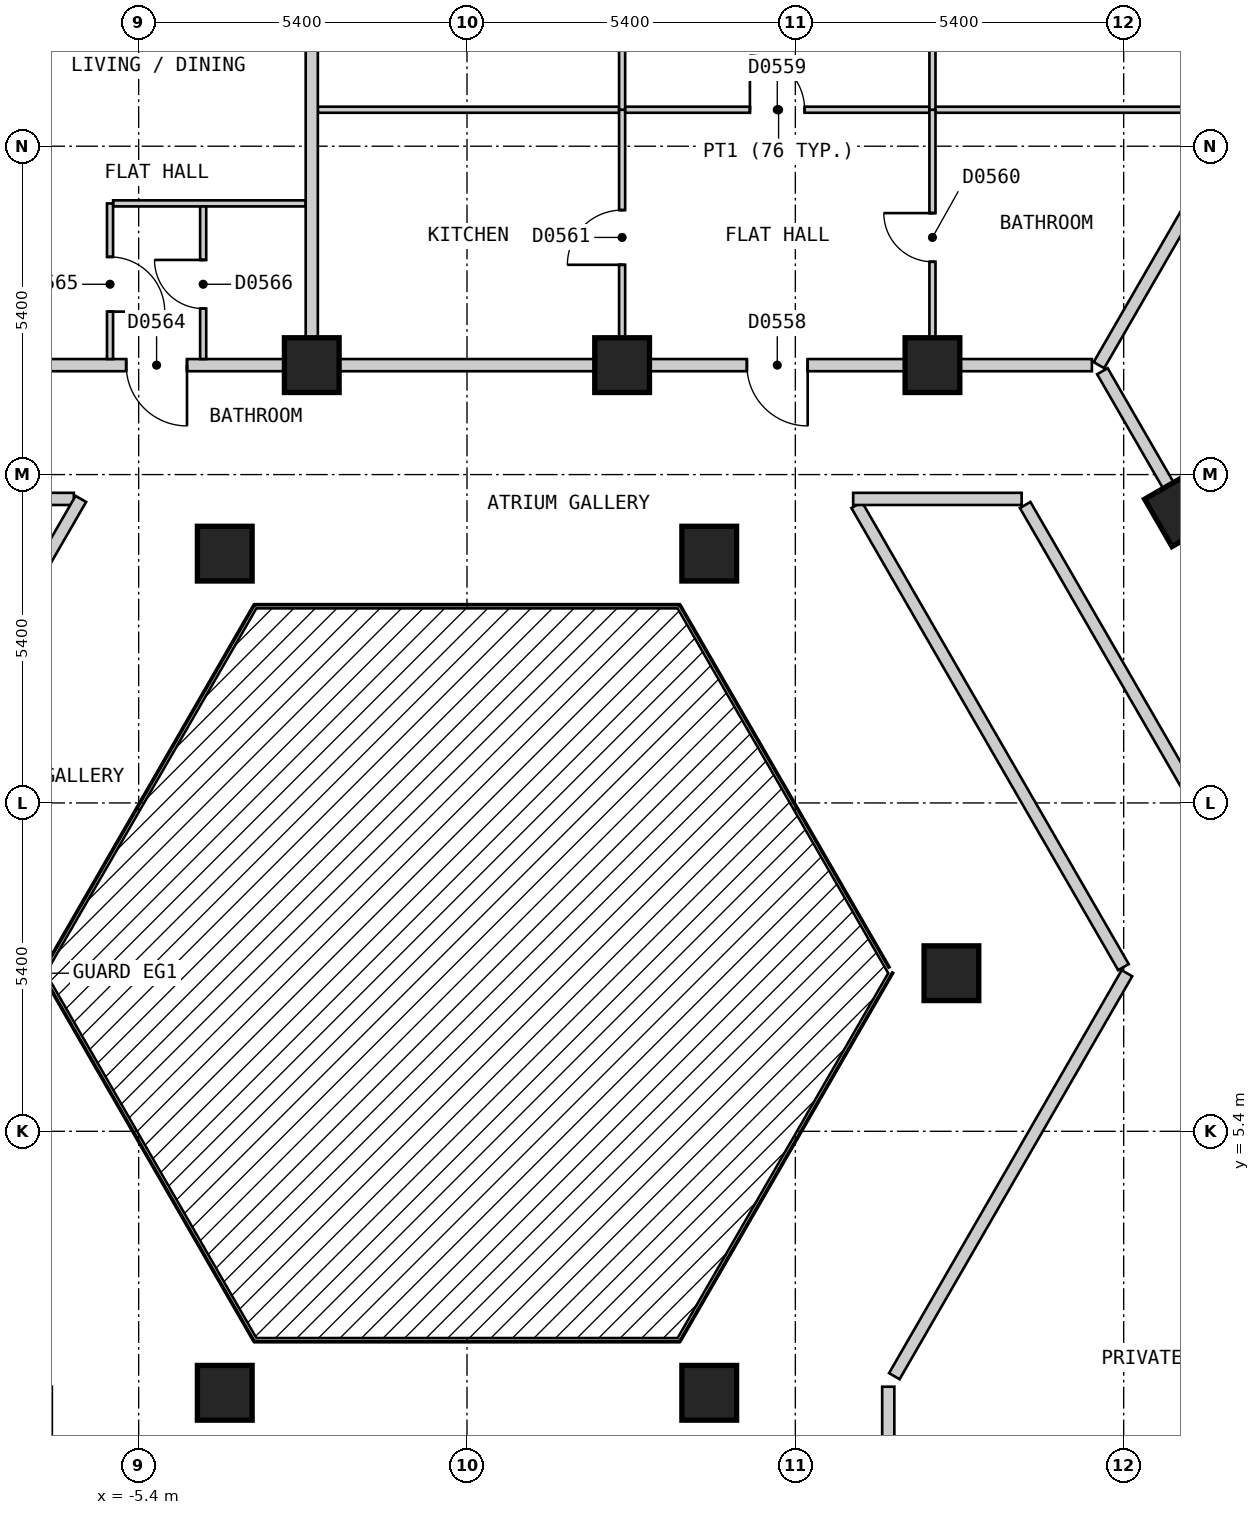
"""IFC4 building model, lengths in metres.
Left out: names, types, materials, properties, quantities, classifications, styles, units other than length and angle.
Written with IfcOpenShell. Run it as: python <this file> out.ifc"""

import sys

from ifc_helpers import new_model, si_unit, direction, frame, frame_2d, origin, origin_2d, place, context, subcontext, project, spatial, rectangle, extrude, element, fill, save


model = new_model("IFC4")
c1 = context("Model", 3, precision=1e-05, world=origin(), true_north=direction((0.0, 1.0)))
c2 = subcontext(c1, "Body", "Model", "MODEL_VIEW")
j1 = project(units=[si_unit("LENGTHUNIT", "METRE"), si_unit("PLANEANGLEUNIT", "RADIAN")], contexts=[c1])
p1 = place(None, origin())
s1 = spatial("IfcSite", under=j1, at=p1, CompositionType="ELEMENT")
p2 = place(p1, origin())
s2 = spatial("IfcBuilding", under=s1, at=p2, CompositionType="ELEMENT")
p3 = place(p2, frame((0.0, 0.0, 56.4)))
s3 = spatial("IfcBuildingStorey", under=s2, at=p3, CompositionType="ELEMENT", Elevation=56.4)
for number, where, z_axis, x_axis in (
    (1, (3.984, 1.1, 0.0), (0.0, 0.0, 1.0), (1.0, 0.0, 0.0)),
    (2, (7.967, 8.0, 0.0), (0.0, 0.0, 1.0), (1.0, 0.0, 0.0)),
    (3, (11.76, 15.631, 0.0), (0.0, 0.0, 1.0), (-0.5, 0.866, 0.0)),
    (4, (7.655, 18.0, 0.0), (0.0, 0.0, 1.0), (-1.0, 0.0, 0.0)),
    (5, (3.984, 14.9, 0.0), (0.0, 0.0, 1.0), (1.0, 0.0, 0.0)),
    (6, (2.551, 18.0, 0.0), (0.0, 0.0, 1.0), (-1.0, 0.0, 0.0)),
    (7, (-2.553, 18.0, 0.0), (0.0, 0.0, 1.0), (-1.0, 0.0, 0.0)),
    (8, (-3.984, 14.9, 0.0), (0.0, 0.0, 1.0), (1.0, 0.0, 0.0)),
    (9, (-3.984, 1.1, 0.0), (0.0, 0.0, 1.0), (1.0, 0.0, 0.0)),
):
    element("IfcColumn", number, at=place(p3, frame(where, z_axis=z_axis, x_axis=x_axis)), inside=s3, PredefinedType="COLUMN", context=c2, shape_type="SweptSolid", body=[
        extrude(rectangle(XDim=0.9, YDim=0.9, at=origin_2d()), origin(), (0.0, 0.0, 1.0), 3.0),
    ])
p4 = place(p3, frame((6.409, 15.7, 0.0), z_axis=(0.0, 0.0, 1.0), x_axis=(0.499930377127, -0.866065596838, 0.0)))
e10 = element("IfcWall", 10, at=p4, inside=s3, PredefinedType="PARTITIONING", context=c2, shape_type="SweptSolid", body=[
    extrude(rectangle(XDim=8.775, YDim=0.2, at=frame_2d((4.388, 0.0))), origin(), (0.0, 0.0, 1.0), 2.7),
])
p5 = place(p3, frame((9.18, 15.7, 0.0), z_axis=(0.0, 0.0, 1.0), x_axis=(0.500003652032, -0.866023295272, 0.0)))
e11 = element("IfcWall", 11, at=p5, inside=s3, PredefinedType="PARTITIONING", context=c2, shape_type="SweptSolid", body=[
    extrude(rectangle(XDim=18.012, YDim=0.2, at=frame_2d((9.006, 0.0))), origin(), (0.0, 0.0, 1.0), 2.7),
])
p6 = place(p5, frame((8.556, 0.0, 0.0)))
e12 = element("IfcOpeningElement", 12, at=p6, cuts=e11, PredefinedType="OPENING", context=c2, shape_type="SweptSolid", body=[
    extrude(rectangle(XDim=0.9, YDim=2.1, at=frame_2d((0.45, 1.05))), frame((0.0, 0.11, 0.0), z_axis=(0.0, -1.0, 0.0), x_axis=(1.0, 0.0, 0.0)), (0.0, 0.0, 1.0), 0.22),
])
p7 = place(p3, frame((10.45, 17.9, 0.0), z_axis=(0.0, 0.0, 1.0), x_axis=(0.500034352617, -0.866005569383, 0.0)))
e13 = element("IfcWall", 13, at=p7, inside=s3, PredefinedType="PARTITIONING", context=c2, shape_type="SweptSolid", body=[
    extrude(rectangle(XDim=20.553, YDim=0.2, at=frame_2d((10.276, 0.0))), origin(), (0.0, 0.0, 1.0), 2.7),
])
p8 = place(p7, frame((14.902, 0.0, 0.0)))
e14 = element("IfcOpeningElement", 14, at=p8, cuts=e13, PredefinedType="OPENING", context=c2, shape_type="SweptSolid", body=[
    extrude(rectangle(XDim=1.0, YDim=2.1, at=frame_2d((0.5, 1.05))), frame((0.0, 0.11, 0.0), z_axis=(0.0, -1.0, 0.0), x_axis=(1.0, 0.0, 0.0)), (0.0, 0.0, 1.0), 0.22),
])
p9 = place(p7, frame((4.671, 0.0, 0.0)))
e15 = element("IfcOpeningElement", 15, at=p9, cuts=e13, PredefinedType="OPENING", context=c2, shape_type="SweptSolid", body=[
    extrude(rectangle(XDim=1.0, YDim=2.1, at=frame_2d((0.5, 1.05))), frame((0.0, 0.11, 0.0), z_axis=(0.0, -1.0, 0.0), x_axis=(1.0, 0.0, 0.0)), (0.0, 0.0, 1.0), 0.22),
])
p10 = place(p3, frame((-9.006, 15.8, 0.0), z_axis=(0.0, 0.0, 1.0), x_axis=(1.0, 0.0, 0.0)))
e16 = element("IfcWall", 16, at=p10, inside=s3, PredefinedType="PARTITIONING", context=c2, shape_type="SweptSolid", body=[
    extrude(rectangle(XDim=2.54, YDim=0.2, at=frame_2d((1.27, 0.0))), origin(), (0.0, 0.0, 1.0), 2.7),
])
p11 = place(p3, frame((6.351, 15.8, 0.0), z_axis=(0.0, 0.0, 1.0), x_axis=(1.0, 0.0, 0.0)))
e17 = element("IfcWall", 17, at=p11, inside=s3, PredefinedType="PARTITIONING", context=c2, shape_type="SweptSolid", body=[
    extrude(rectangle(XDim=2.771, YDim=0.2, at=frame_2d((1.385, 0.0))), origin(), (0.0, 0.0, 1.0), 2.7),
])
p12 = place(p3, frame((-10.276, 18.0, 0.0), z_axis=(0.0, 0.0, 1.0), x_axis=(1.0, 0.0, 0.0)))
e18 = element("IfcWall", 18, at=p12, inside=s3, PredefinedType="PARTITIONING", context=c2, shape_type="SweptSolid", body=[
    extrude(rectangle(XDim=20.553, YDim=0.2, at=frame_2d((10.276, 0.0))), origin(), (0.0, 0.0, 1.0), 2.7),
])
p13 = place(p12, frame((14.879, 0.0, 0.0)))
e19 = element("IfcOpeningElement", 19, at=p13, cuts=e18, PredefinedType="OPENING", context=c2, shape_type="SweptSolid", body=[
    extrude(rectangle(XDim=1.0, YDim=2.1, at=frame_2d((0.5, 1.05))), frame((0.0, 0.11, 0.0), z_axis=(0.0, -1.0, 0.0), x_axis=(1.0, 0.0, 0.0)), (0.0, 0.0, 1.0), 0.22),
])
p14 = place(p12, frame((4.671, 0.0, 0.0)))
e20 = element("IfcOpeningElement", 20, at=p14, cuts=e18, PredefinedType="OPENING", context=c2, shape_type="SweptSolid", body=[
    extrude(rectangle(XDim=1.0, YDim=2.1, at=frame_2d((0.5, 1.05))), frame((0.0, 0.11, 0.0), z_axis=(0.0, -1.0, 0.0), x_axis=(1.0, 0.0, 0.0)), (0.0, 0.0, 1.0), 0.22),
])
p15 = place(p3, frame((7.028, 1.373, 0.0), z_axis=(0.0, 0.0, 1.0), x_axis=(0.49998574534, 0.86603363356, 0.0)))
e21 = element("IfcWall", 21, at=p15, inside=s3, PredefinedType="PARTITIONING", context=c2, shape_type="SweptSolid", body=[
    extrude(rectangle(XDim=7.652, YDim=0.2, at=frame_2d((3.826, 0.0))), origin(), (0.0, 0.0, 1.0), 2.7),
])
p16 = place(p3, frame((-10.854, 8.0, 0.0), z_axis=(0.0, 0.0, 1.0), x_axis=(0.499964141897, 0.86604610548, 0.0)))
e22 = element("IfcWall", 22, at=p16, inside=s3, PredefinedType="PARTITIONING", context=c2, shape_type="SweptSolid", body=[
    extrude(rectangle(XDim=9.007, YDim=0.2, at=frame_2d((4.503, 0.0))), origin(), (0.0, 0.0, 1.0), 2.7),
])
p17 = place(p3, frame((6.928, -2.8, 0.0), z_axis=(0.0, 0.0, 1.0), x_axis=(0.0, 1.0, 0.0)))
e23 = element("IfcWall", 23, at=p17, inside=s3, PredefinedType="PARTITIONING", context=c2, shape_type="SweptSolid", body=[
    extrude(rectangle(XDim=4.0, YDim=0.2, at=frame_2d((2.0, 0.0))), origin(), (0.0, 0.0, 1.0), 2.7),
])
p18 = place(p3, frame((-5.82, 20.66, 0.0), z_axis=(0.0, 0.0, 1.0), x_axis=(1.0, 0.0, 0.0)))
e24 = element("IfcWall", 24, at=p18, inside=s3, PredefinedType="PARTITIONING", context=c2, shape_type="SweptSolid", body=[
    extrude(rectangle(XDim=3.167, YDim=0.1, at=frame_2d((1.583, 0.0))), origin(), (0.0, 0.0, 1.0), 2.7),
])
p19 = place(p3, frame((-2.453, 22.2, 0.0), z_axis=(0.0, 0.0, 1.0), x_axis=(1.0, 0.0, 0.0)))
e25 = element("IfcWall", 25, at=p19, inside=s3, PredefinedType="PARTITIONING", context=c2, shape_type="SweptSolid", body=[
    extrude(rectangle(XDim=15.155, YDim=0.1, at=frame_2d((7.577, 0.0))), origin(), (0.0, 0.0, 1.0), 2.7),
])
p20 = place(p19, frame((7.106, 0.0, 0.0)))
e26 = element("IfcOpeningElement", 26, at=p20, cuts=e25, PredefinedType="OPENING", context=c2, shape_type="SweptSolid", body=[
    extrude(rectangle(XDim=0.9, YDim=2.1, at=frame_2d((0.45, 1.05))), frame((0.0, 0.06, 0.0), z_axis=(0.0, -1.0, 0.0), x_axis=(1.0, 0.0, 0.0)), (0.0, 0.0, 1.0), 0.12),
])
p21 = place(p3, frame((7.655, 18.1, 0.0), z_axis=(0.0, 0.0, 1.0), x_axis=(0.0, 1.0, 0.0)))
e27 = element("IfcWall", 27, at=p21, inside=s3, PredefinedType="PARTITIONING", context=c2, shape_type="SweptSolid", body=[
    extrude(rectangle(XDim=4.1, YDim=0.1, at=frame_2d((2.05, 0.0))), origin(), (0.0, 0.0, 1.0), 2.7),
])
p22 = place(p21, frame((1.6, 0.0, 0.0)))
e28 = element("IfcOpeningElement", 28, at=p22, cuts=e27, PredefinedType="OPENING", context=c2, shape_type="SweptSolid", body=[
    extrude(rectangle(XDim=0.8, YDim=2.1, at=frame_2d((0.4, 1.05))), frame((0.0, 0.06, 0.0), z_axis=(0.0, -1.0, 0.0), x_axis=(1.0, 0.0, 0.0)), (0.0, 0.0, 1.0), 0.12),
])
p23 = place(p3, frame((2.551, 18.1, 0.0), z_axis=(0.0, 0.0, 1.0), x_axis=(0.0, 1.0, 0.0)))
e29 = element("IfcWall", 29, at=p23, inside=s3, PredefinedType="PARTITIONING", context=c2, shape_type="SweptSolid", body=[
    extrude(rectangle(XDim=4.1, YDim=0.1, at=frame_2d((2.05, 0.0))), origin(), (0.0, 0.0, 1.0), 2.7),
])
p24 = place(p23, frame((1.55, 0.0, 0.0)))
e30 = element("IfcOpeningElement", 30, at=p24, cuts=e29, PredefinedType="OPENING", context=c2, shape_type="SweptSolid", body=[
    extrude(rectangle(XDim=0.9, YDim=2.1, at=frame_2d((0.45, 1.05))), frame((0.0, 0.06, 0.0), z_axis=(0.0, -1.0, 0.0), x_axis=(1.0, 0.0, 0.0)), (0.0, 0.0, 1.0), 0.12),
])
p25 = place(p3, frame((-4.339, 18.1, 0.0), z_axis=(0.0, 0.0, 1.0), x_axis=(0.0, 1.0, 0.0)))
e31 = element("IfcWall", 31, at=p25, inside=s3, PredefinedType="PARTITIONING", context=c2, shape_type="SweptSolid", body=[
    extrude(rectangle(XDim=2.51, YDim=0.1, at=frame_2d((1.255, 0.0))), origin(), (0.0, 0.0, 1.0), 2.7),
])
p26 = place(p25, frame((0.83, 0.0, 0.0)))
e32 = element("IfcOpeningElement", 32, at=p26, cuts=e31, PredefinedType="OPENING", context=c2, shape_type="SweptSolid", body=[
    extrude(rectangle(XDim=0.8, YDim=2.1, at=frame_2d((0.4, 1.05))), frame((0.0, 0.06, 0.0), z_axis=(0.0, -1.0, 0.0), x_axis=(1.0, 0.0, 0.0)), (0.0, 0.0, 1.0), 0.12),
])
p27 = place(p3, frame((-5.871, 18.1, 0.0), z_axis=(0.0, 0.0, 1.0), x_axis=(0.0, 1.0, 0.0)))
e33 = element("IfcWall", 33, at=p27, inside=s3, PredefinedType="PARTITIONING", context=c2, shape_type="SweptSolid", body=[
    extrude(rectangle(XDim=2.559, YDim=0.1, at=frame_2d((1.279, 0.0))), origin(), (0.0, 0.0, 1.0), 2.7),
])
p28 = place(p27, frame((0.78, 0.0, 0.0)))
e34 = element("IfcOpeningElement", 34, at=p28, cuts=e33, PredefinedType="OPENING", context=c2, shape_type="SweptSolid", body=[
    extrude(rectangle(XDim=0.9, YDim=2.1, at=frame_2d((0.45, 1.05))), frame((0.0, 0.06, 0.0), z_axis=(0.0, -1.0, 0.0), x_axis=(1.0, 0.0, 0.0)), (0.0, 0.0, 1.0), 0.12),
])
p29 = place(p3, frame((10.393, 18.0, 0.0), z_axis=(0.0, 0.0, 1.0), x_axis=(0.499945497007, 0.866056868816, 0.0)))
e35 = element("IfcWall", 35, at=p29, inside=s3, PredefinedType="PARTITIONING", context=c2, shape_type="SweptSolid", body=[
    extrude(rectangle(XDim=10.265, YDim=0.2, at=frame_2d((5.132, 0.0))), origin(), (0.0, 0.0, 1.0), 2.7),
])
p30 = place(p3, frame((-2.553, 18.1, 0.0), z_axis=(0.0, 0.0, 1.0), x_axis=(0.0, 1.0, 0.0)))
e36 = element("IfcWall", 36, at=p30, inside=s3, PredefinedType="PARTITIONING", context=c2, shape_type="SweptSolid", body=[
    extrude(rectangle(XDim=10.0, YDim=0.2, at=frame_2d((5.0, 0.0))), origin(), (0.0, 0.0, 1.0), 2.7),
])
p31 = place(p3, frame((7.655, 22.2, 0.0), z_axis=(0.0, 0.0, 1.0), x_axis=(0.0, 1.0, 0.0)))
e37 = element("IfcWall", 37, at=p31, inside=s3, PredefinedType="PARTITIONING", context=c2, shape_type="SweptSolid", body=[
    extrude(rectangle(XDim=5.9, YDim=0.1, at=frame_2d((2.95, 0.0))), origin(), (0.0, 0.0, 1.0), 2.7),
])
p32 = place(p31, frame((2.5, 0.0, 0.0)))
e38 = element("IfcOpeningElement", 38, at=p32, cuts=e37, PredefinedType="OPENING", context=c2, shape_type="SweptSolid", body=[
    extrude(rectangle(XDim=0.9, YDim=2.1, at=frame_2d((0.45, 1.05))), frame((0.0, 0.06, 0.0), z_axis=(0.0, -1.0, 0.0), x_axis=(1.0, 0.0, 0.0)), (0.0, 0.0, 1.0), 0.12),
])
p33 = place(p3, frame((2.551, 22.2, 0.0), z_axis=(0.0, 0.0, 1.0), x_axis=(0.0, 1.0, 0.0)))
e39 = element("IfcWall", 39, at=p33, inside=s3, PredefinedType="PARTITIONING", context=c2, shape_type="SweptSolid", body=[
    extrude(rectangle(XDim=5.9, YDim=0.1, at=frame_2d((2.95, 0.0))), origin(), (0.0, 0.0, 1.0), 2.7),
])
p34 = place(p33, frame((2.5, 0.0, 0.0)))
e40 = element("IfcOpeningElement", 40, at=p34, cuts=e39, PredefinedType="OPENING", context=c2, shape_type="SweptSolid", body=[
    extrude(rectangle(XDim=0.9, YDim=2.1, at=frame_2d((0.45, 1.05))), frame((0.0, 0.06, 0.0), z_axis=(0.0, -1.0, 0.0), x_axis=(1.0, 0.0, 0.0)), (0.0, 0.0, 1.0), 0.12),
])
p35 = place(p13, origin())
e41 = element("IfcDoor", 41, at=p35, inside=s3, OperationType="SINGLE_SWING_RIGHT", PredefinedType="DOOR", context=c2, shape_type="SweptSolid", body=[
    extrude(rectangle(XDim=1.0, YDim=2.1, at=frame_2d((0.5, 1.05))), frame((0.0, 0.025, 0.0), z_axis=(0.0, -1.0, 0.0), x_axis=(1.0, 0.0, 0.0)), (0.0, 0.0, 1.0), 0.05),
])
fill(e19, e41)
p36 = place(p20, origin())
e42 = element("IfcDoor", 42, at=p36, inside=s3, OperationType="SINGLE_SWING_LEFT", PredefinedType="DOOR", context=c2, shape_type="SweptSolid", body=[
    extrude(rectangle(XDim=0.9, YDim=2.1, at=frame_2d((0.45, 1.05))), frame((0.0, 0.025, 0.0), z_axis=(0.0, -1.0, 0.0), x_axis=(1.0, 0.0, 0.0)), (0.0, 0.0, 1.0), 0.05),
])
fill(e26, e42)
p37 = place(p22, origin())
e43 = element("IfcDoor", 43, at=p37, inside=s3, OperationType="SINGLE_SWING_RIGHT", PredefinedType="DOOR", context=c2, shape_type="SweptSolid", body=[
    extrude(rectangle(XDim=0.8, YDim=2.1, at=frame_2d((0.4, 1.05))), frame((0.0, 0.025, 0.0), z_axis=(0.0, -1.0, 0.0), x_axis=(1.0, 0.0, 0.0)), (0.0, 0.0, 1.0), 0.05),
])
fill(e28, e43)
p38 = place(p24, origin())
e44 = element("IfcDoor", 44, at=p38, inside=s3, OperationType="SINGLE_SWING_LEFT", PredefinedType="DOOR", context=c2, shape_type="SweptSolid", body=[
    extrude(rectangle(XDim=0.9, YDim=2.1, at=frame_2d((0.45, 1.05))), frame((0.0, 0.025, 0.0), z_axis=(0.0, -1.0, 0.0), x_axis=(1.0, 0.0, 0.0)), (0.0, 0.0, 1.0), 0.05),
])
fill(e30, e44)
p39 = place(p14, origin())
e45 = element("IfcDoor", 45, at=p39, inside=s3, OperationType="SINGLE_SWING_RIGHT", PredefinedType="DOOR", context=c2, shape_type="SweptSolid", body=[
    extrude(rectangle(XDim=1.0, YDim=2.1, at=frame_2d((0.5, 1.05))), frame((0.0, 0.025, 0.0), z_axis=(0.0, -1.0, 0.0), x_axis=(1.0, 0.0, 0.0)), (0.0, 0.0, 1.0), 0.05),
])
fill(e20, e45)
p40 = place(p28, origin())
e46 = element("IfcDoor", 46, at=p40, inside=s3, OperationType="SINGLE_SWING_LEFT", PredefinedType="DOOR", context=c2, shape_type="SweptSolid", body=[
    extrude(rectangle(XDim=0.9, YDim=2.1, at=frame_2d((0.45, 1.05))), frame((0.0, 0.025, 0.0), z_axis=(0.0, -1.0, 0.0), x_axis=(1.0, 0.0, 0.0)), (0.0, 0.0, 1.0), 0.05),
])
fill(e34, e46)
p41 = place(p26, origin())
e47 = element("IfcDoor", 47, at=p41, inside=s3, OperationType="SINGLE_SWING_RIGHT", PredefinedType="DOOR", context=c2, shape_type="SweptSolid", body=[
    extrude(rectangle(XDim=0.8, YDim=2.1, at=frame_2d((0.4, 1.05))), frame((0.0, 0.025, 0.0), z_axis=(0.0, -1.0, 0.0), x_axis=(1.0, 0.0, 0.0)), (0.0, 0.0, 1.0), 0.05),
])
fill(e32, e47)
save(model, sys.argv[1])
